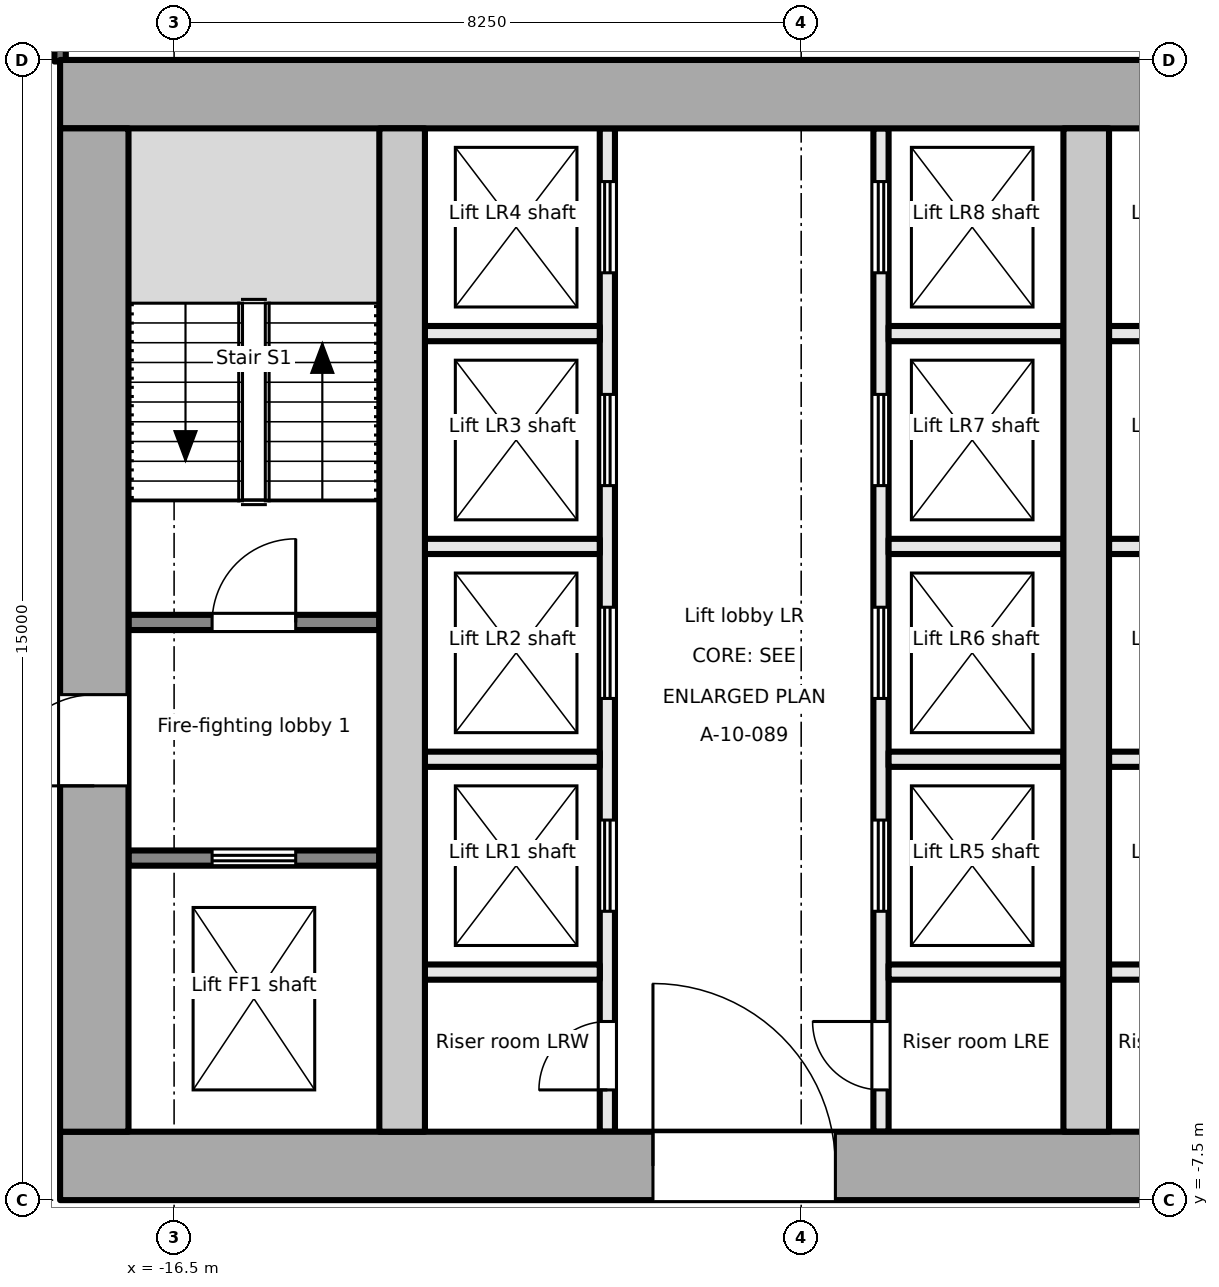
"""IFC4 building model, lengths in metres.
Left out: names, types, materials, properties, quantities, classifications, styles, units other than length and angle.
Written with IfcOpenShell. Run it as: python <this file> out.ifc"""

import sys

from ifc_helpers import new_model, si_unit, direction, frame, frame_2d, origin, place, context, subcontext, project, spatial, rectangle, extrude, element, fill, save


model = new_model("IFC4")
c1 = context("Model", 3, precision=1e-05, world=origin(), true_north=direction((0.0, 1.0)))
c2 = subcontext(c1, "Body", "Model", "MODEL_VIEW")
j1 = project(units=[si_unit("LENGTHUNIT", "METRE"), si_unit("PLANEANGLEUNIT", "RADIAN")], contexts=[c1])
p1 = place(None, origin())
s1 = spatial("IfcSite", under=j1, at=p1, CompositionType="ELEMENT")
p2 = place(p1, origin())
s2 = spatial("IfcBuilding", under=s1, at=p2, CompositionType="ELEMENT")
p3 = place(p2, frame((0.0, 0.0, 65.2)))
s3 = spatial("IfcBuildingStorey", under=s2, at=p3, CompositionType="ELEMENT", Elevation=65.2)
p4 = place(p3, frame((-18.0, -7.05, -0.2), z_axis=(0.0, 0.0, 1.0), x_axis=(1.0, 0.0, 0.0)))
e1 = element("IfcWall", 1, at=p4, inside=s3, PredefinedType="SHEAR", context=c2, shape_type="SweptSolid", body=[
    extrude(rectangle(XDim=36.0, YDim=0.9, at=frame_2d((18.0, 0.0))), origin(), (0.0, 0.0, 1.0), 4.1),
])
p5 = place(p4, frame((7.8, 0.0, 0.2)))
e2 = element("IfcOpeningElement", 2, at=p5, cuts=e1, PredefinedType="OPENING", context=c2, shape_type="SweptSolid", body=[
    extrude(rectangle(XDim=2.4, YDim=2.1, at=frame_2d((1.2, 1.05))), frame((0.0, 0.46, 0.0), z_axis=(0.0, -1.0, 0.0), x_axis=(1.0, 0.0, 0.0)), (0.0, 0.0, 1.0), 0.921),
])
p6 = place(p4, frame((17.4, 0.0, 0.2)))
e3 = element("IfcOpeningElement", 3, at=p6, cuts=e1, PredefinedType="OPENING", context=c2, shape_type="SweptSolid", body=[
    extrude(rectangle(XDim=1.2, YDim=2.1, at=frame_2d((0.6, 1.05))), frame((0.0, 0.46, 0.0), z_axis=(0.0, -1.0, 0.0), x_axis=(1.0, 0.0, 0.0)), (0.0, 0.0, 1.0), 0.921),
])
p7 = place(p4, frame((26.1, 0.0, 0.2)))
e4 = element("IfcOpeningElement", 4, at=p7, cuts=e1, PredefinedType="OPENING", context=c2, shape_type="SweptSolid", body=[
    extrude(rectangle(XDim=2.4, YDim=2.1, at=frame_2d((1.2, 1.05))), frame((0.0, 0.46, 0.0), z_axis=(0.0, -1.0, 0.0), x_axis=(1.0, 0.0, 0.0)), (0.0, 0.0, 1.0), 0.921),
])
p8 = place(p3, frame((-18.0, 7.05, -0.2), z_axis=(0.0, 0.0, 1.0), x_axis=(1.0, 0.0, 0.0)))
e5 = element("IfcWall", 5, at=p8, inside=s3, PredefinedType="SHEAR", context=c2, shape_type="SweptSolid", body=[
    extrude(rectangle(XDim=36.0, YDim=0.9, at=frame_2d((18.0, 0.0))), origin(), (0.0, 0.0, 1.0), 4.1),
])
p9 = place(p3, frame((-17.55, -6.6, -0.2), z_axis=(0.0, 0.0, 1.0), x_axis=(0.0, 1.0, 0.0)))
e6 = element("IfcWall", 6, at=p9, inside=s3, PredefinedType="SHEAR", context=c2, shape_type="SweptSolid", body=[
    extrude(rectangle(XDim=13.2, YDim=0.9, at=frame_2d((6.6, 0.0))), origin(), (0.0, 0.0, 1.0), 4.1),
])
p10 = place(p9, frame((4.55, 0.0, 0.2)))
e7 = element("IfcOpeningElement", 7, at=p10, cuts=e6, PredefinedType="OPENING", context=c2, shape_type="SweptSolid", body=[
    extrude(rectangle(XDim=1.2, YDim=2.1, at=frame_2d((0.6, 1.05))), frame((0.0, 0.46, 0.0), z_axis=(0.0, -1.0, 0.0), x_axis=(1.0, 0.0, 0.0)), (0.0, 0.0, 1.0), 0.921),
])
for number, where, z_axis, x_axis in (
    (8, (-13.5, -6.6, -0.2), (0.0, 0.0, 1.0), (0.0, 1.0, 0.0)),
    (9, (-4.5, -6.6, -0.2), (0.0, 0.0, 1.0), (0.0, 1.0, 0.0)),
):
    element("IfcWall", number, at=place(p3, frame(where, z_axis=z_axis, x_axis=x_axis)), inside=s3, PredefinedType="SHEAR", context=c2, shape_type="SweptSolid", body=[
        extrude(rectangle(XDim=13.2, YDim=0.6, at=frame_2d((6.6, 0.0))), origin(), (0.0, 0.0, 1.0), 4.1),
    ])
p11 = place(p3, frame((-17.1, -3.0, 0.0), z_axis=(0.0, 0.0, 1.0), x_axis=(1.0, 0.0, 0.0)))
e10 = element("IfcWall", 10, at=p11, inside=s3, PredefinedType="PARTITIONING", context=c2, shape_type="SweptSolid", body=[
    extrude(rectangle(XDim=3.3, YDim=0.2, at=frame_2d((1.65, 0.0))), origin(), (0.0, 0.0, 1.0), 3.9),
])
p12 = place(p11, frame((1.1, 0.0, 0.0)))
e11 = element("IfcOpeningElement", 11, at=p12, cuts=e10, PredefinedType="OPENING", context=c2, shape_type="SweptSolid", body=[
    extrude(rectangle(XDim=1.1, YDim=2.1, at=frame_2d((0.55, 1.05))), frame((0.0, 0.111, 0.0), z_axis=(0.0, -1.0, 0.0), x_axis=(1.0, 0.0, 0.0)), (0.0, 0.0, 1.0), 0.221),
])
p13 = place(p3, frame((-17.1, 0.1, 0.0), z_axis=(0.0, 0.0, 1.0), x_axis=(1.0, 0.0, 0.0)))
e12 = element("IfcWall", 12, at=p13, inside=s3, PredefinedType="PARTITIONING", context=c2, shape_type="SweptSolid", body=[
    extrude(rectangle(XDim=3.3, YDim=0.2, at=frame_2d((1.65, 0.0))), origin(), (0.0, 0.0, 1.0), 3.9),
])
p14 = place(p13, frame((1.1, 0.0, 0.0)))
e13 = element("IfcOpeningElement", 13, at=p14, cuts=e12, PredefinedType="OPENING", context=c2, shape_type="SweptSolid", body=[
    extrude(rectangle(XDim=1.1, YDim=2.1, at=frame_2d((0.55, 1.05))), frame((0.0, 0.111, 0.0), z_axis=(0.0, -1.0, 0.0), x_axis=(1.0, 0.0, 0.0)), (0.0, 0.0, 1.0), 0.221),
])
p15 = place(p3, frame((-10.8, -6.6, 0.0), z_axis=(0.0, 0.0, 1.0), x_axis=(0.0, 1.0, 0.0)))
e14 = element("IfcWall", 14, at=p15, inside=s3, PredefinedType="PARTITIONING", context=c2, shape_type="SweptSolid", body=[
    extrude(rectangle(XDim=13.2, YDim=0.2, at=frame_2d((6.6, 0.0))), origin(), (0.0, 0.0, 1.0), 3.9),
])
p16 = place(p15, frame((0.55, 0.0, 0.0)))
e15 = element("IfcOpeningElement", 15, at=p16, cuts=e14, PredefinedType="OPENING", context=c2, shape_type="SweptSolid", body=[
    extrude(rectangle(XDim=0.9, YDim=2.1, at=frame_2d((0.45, 1.05))), frame((0.0, 0.111, 0.0), z_axis=(0.0, -1.0, 0.0), x_axis=(1.0, 0.0, 0.0)), (0.0, 0.0, 1.0), 0.221),
])
p17 = place(p15, frame((2.9, 0.0, 0.0)))
e16 = element("IfcOpeningElement", 16, at=p17, cuts=e14, PredefinedType="OPENING", context=c2, shape_type="SweptSolid", body=[
    extrude(rectangle(XDim=1.2, YDim=2.1, at=frame_2d((0.6, 1.05))), frame((0.0, 0.111, 0.0), z_axis=(0.0, -1.0, 0.0), x_axis=(1.0, 0.0, 0.0)), (0.0, 0.0, 1.0), 0.221),
])
p18 = place(p15, frame((5.7, 0.0, 0.0)))
e17 = element("IfcOpeningElement", 17, at=p18, cuts=e14, PredefinedType="OPENING", context=c2, shape_type="SweptSolid", body=[
    extrude(rectangle(XDim=1.2, YDim=2.1, at=frame_2d((0.6, 1.05))), frame((0.0, 0.111, 0.0), z_axis=(0.0, -1.0, 0.0), x_axis=(1.0, 0.0, 0.0)), (0.0, 0.0, 1.0), 0.221),
])
p19 = place(p15, frame((8.5, 0.0, 0.0)))
e18 = element("IfcOpeningElement", 18, at=p19, cuts=e14, PredefinedType="OPENING", context=c2, shape_type="SweptSolid", body=[
    extrude(rectangle(XDim=1.2, YDim=2.1, at=frame_2d((0.6, 1.05))), frame((0.0, 0.111, 0.0), z_axis=(0.0, -1.0, 0.0), x_axis=(1.0, 0.0, 0.0)), (0.0, 0.0, 1.0), 0.221),
])
p20 = place(p15, frame((11.3, 0.0, 0.0)))
e19 = element("IfcOpeningElement", 19, at=p20, cuts=e14, PredefinedType="OPENING", context=c2, shape_type="SweptSolid", body=[
    extrude(rectangle(XDim=1.2, YDim=2.1, at=frame_2d((0.6, 1.05))), frame((0.0, 0.111, 0.0), z_axis=(0.0, -1.0, 0.0), x_axis=(1.0, 0.0, 0.0)), (0.0, 0.0, 1.0), 0.221),
])
p21 = place(p3, frame((-7.2, -6.6, 0.0), z_axis=(0.0, 0.0, 1.0), x_axis=(0.0, 1.0, 0.0)))
e20 = element("IfcWall", 20, at=p21, inside=s3, PredefinedType="PARTITIONING", context=c2, shape_type="SweptSolid", body=[
    extrude(rectangle(XDim=13.2, YDim=0.2, at=frame_2d((6.6, 0.0))), origin(), (0.0, 0.0, 1.0), 3.9),
])
p22 = place(p21, frame((0.55, 0.0, 0.0)))
e21 = element("IfcOpeningElement", 21, at=p22, cuts=e20, PredefinedType="OPENING", context=c2, shape_type="SweptSolid", body=[
    extrude(rectangle(XDim=0.9, YDim=2.1, at=frame_2d((0.45, 1.05))), frame((0.0, 0.111, 0.0), z_axis=(0.0, -1.0, 0.0), x_axis=(1.0, 0.0, 0.0)), (0.0, 0.0, 1.0), 0.221),
])
p23 = place(p21, frame((2.9, 0.0, 0.0)))
e22 = element("IfcOpeningElement", 22, at=p23, cuts=e20, PredefinedType="OPENING", context=c2, shape_type="SweptSolid", body=[
    extrude(rectangle(XDim=1.2, YDim=2.1, at=frame_2d((0.6, 1.05))), frame((0.0, 0.111, 0.0), z_axis=(0.0, -1.0, 0.0), x_axis=(1.0, 0.0, 0.0)), (0.0, 0.0, 1.0), 0.221),
])
p24 = place(p21, frame((5.7, 0.0, 0.0)))
e23 = element("IfcOpeningElement", 23, at=p24, cuts=e20, PredefinedType="OPENING", context=c2, shape_type="SweptSolid", body=[
    extrude(rectangle(XDim=1.2, YDim=2.1, at=frame_2d((0.6, 1.05))), frame((0.0, 0.111, 0.0), z_axis=(0.0, -1.0, 0.0), x_axis=(1.0, 0.0, 0.0)), (0.0, 0.0, 1.0), 0.221),
])
p25 = place(p21, frame((8.5, 0.0, 0.0)))
e24 = element("IfcOpeningElement", 24, at=p25, cuts=e20, PredefinedType="OPENING", context=c2, shape_type="SweptSolid", body=[
    extrude(rectangle(XDim=1.2, YDim=2.1, at=frame_2d((0.6, 1.05))), frame((0.0, 0.111, 0.0), z_axis=(0.0, -1.0, 0.0), x_axis=(1.0, 0.0, 0.0)), (0.0, 0.0, 1.0), 0.221),
])
p26 = place(p21, frame((11.3, 0.0, 0.0)))
e25 = element("IfcOpeningElement", 25, at=p26, cuts=e20, PredefinedType="OPENING", context=c2, shape_type="SweptSolid", body=[
    extrude(rectangle(XDim=1.2, YDim=2.1, at=frame_2d((0.6, 1.05))), frame((0.0, 0.111, 0.0), z_axis=(0.0, -1.0, 0.0), x_axis=(1.0, 0.0, 0.0)), (0.0, 0.0, 1.0), 0.221),
])
for number, where, z_axis, x_axis in (
    (26, (-13.2, -1.7, 0.0), (0.0, 0.0, 1.0), (1.0, 0.0, 0.0)),
    (27, (-13.2, 1.1, 0.0), (0.0, 0.0, 1.0), (1.0, 0.0, 0.0)),
    (28, (-13.2, 3.9, 0.0), (0.0, 0.0, 1.0), (1.0, 0.0, 0.0)),
    (29, (-13.2, -4.5, 0.0), (0.0, 0.0, 1.0), (1.0, 0.0, 0.0)),
    (30, (-7.1, -1.7, 0.0), (0.0, 0.0, 1.0), (1.0, 0.0, 0.0)),
    (31, (-7.1, 1.1, 0.0), (0.0, 0.0, 1.0), (1.0, 0.0, 0.0)),
    (32, (-7.1, 3.9, 0.0), (0.0, 0.0, 1.0), (1.0, 0.0, 0.0)),
    (33, (-7.1, -4.5, 0.0), (0.0, 0.0, 1.0), (1.0, 0.0, 0.0)),
    (34, (-4.2, -1.7, 0.0), (0.0, 0.0, 1.0), (1.0, 0.0, 0.0)),
    (35, (-4.2, 1.1, 0.0), (0.0, 0.0, 1.0), (1.0, 0.0, 0.0)),
    (36, (-4.2, 3.9, 0.0), (0.0, 0.0, 1.0), (1.0, 0.0, 0.0)),
    (37, (-4.2, -4.5, 0.0), (0.0, 0.0, 1.0), (1.0, 0.0, 0.0)),
):
    element("IfcWall", number, at=place(p3, frame(where, z_axis=z_axis, x_axis=x_axis)), inside=s3, PredefinedType="PARTITIONING", context=c2, shape_type="SweptSolid", body=[
        extrude(rectangle(XDim=2.3, YDim=0.2, at=frame_2d((1.15, 0.0))), origin(), (0.0, 0.0, 1.0), 3.9),
    ])
p27 = place(p3, frame((-18.0, 9.74, 0.0), z_axis=(0.0, 0.0, 1.0), x_axis=(0.0, -1.0, 0.0)))
e38 = element("IfcWall", 38, at=p27, inside=s3, PredefinedType="PARTITIONING", context=c2, shape_type="SweptSolid", body=[
    extrude(rectangle(XDim=2.26, YDim=0.15, at=frame_2d((1.13, 0.0))), origin(), (0.0, 0.0, 1.0), 2.9),
])
p28 = place(p27, frame((0.895, 0.0, 0.0)))
e39 = element("IfcOpeningElement", 39, at=p28, cuts=e38, PredefinedType="OPENING", context=c2, shape_type="SweptSolid", body=[
    extrude(rectangle(XDim=0.9, YDim=2.1, at=frame_2d((0.45, 1.05))), frame((0.0, 0.085, 0.0), z_axis=(0.0, -1.0, 0.0), x_axis=(1.0, 0.0, 0.0)), (0.0, 0.0, 1.0), 0.171),
])
p29 = place(p12, origin())
e40 = element("IfcDoor", 40, at=p29, inside=s3, OperationType="DOUBLE_DOOR_SLIDING", PredefinedType="DOOR", context=c2, shape_type="SweptSolid", body=[
    extrude(rectangle(XDim=1.1, YDim=2.1, at=frame_2d((0.55, 1.05))), frame((0.0, 0.025, 0.0), z_axis=(0.0, -1.0, 0.0), x_axis=(1.0, 0.0, 0.0)), (0.0, 0.0, 1.0), 0.05),
])
fill(e11, e40)
p30 = place(p10, origin())
e41 = element("IfcDoor", 41, at=p30, inside=s3, OperationType="SINGLE_SWING_LEFT", PredefinedType="DOOR", context=c2, shape_type="SweptSolid", body=[
    extrude(rectangle(XDim=1.2, YDim=2.1, at=frame_2d((0.6, 1.05))), frame((0.0, 0.025, 0.0), z_axis=(0.0, -1.0, 0.0), x_axis=(1.0, 0.0, 0.0)), (0.0, 0.0, 1.0), 0.05),
])
fill(e7, e41)
p31 = place(p14, origin())
e42 = element("IfcDoor", 42, at=p31, inside=s3, OperationType="SINGLE_SWING_RIGHT", PredefinedType="DOOR", context=c2, shape_type="SweptSolid", body=[
    extrude(rectangle(XDim=1.1, YDim=2.1, at=frame_2d((0.55, 1.05))), frame((0.0, 0.025, 0.0), z_axis=(0.0, -1.0, 0.0), x_axis=(1.0, 0.0, 0.0)), (0.0, 0.0, 1.0), 0.05),
])
fill(e13, e42)
p32 = place(p16, origin())
e43 = element("IfcDoor", 43, at=p32, inside=s3, OperationType="SINGLE_SWING_LEFT", PredefinedType="DOOR", context=c2, shape_type="SweptSolid", body=[
    extrude(rectangle(XDim=0.9, YDim=2.1, at=frame_2d((0.45, 1.05))), frame((0.0, 0.025, 0.0), z_axis=(0.0, -1.0, 0.0), x_axis=(1.0, 0.0, 0.0)), (0.0, 0.0, 1.0), 0.05),
])
fill(e15, e43)
p33 = place(p17, origin())
e44 = element("IfcDoor", 44, at=p33, inside=s3, OperationType="DOUBLE_DOOR_SLIDING", PredefinedType="DOOR", context=c2, shape_type="SweptSolid", body=[
    extrude(rectangle(XDim=1.2, YDim=2.1, at=frame_2d((0.6, 1.05))), frame((0.0, 0.025, 0.0), z_axis=(0.0, -1.0, 0.0), x_axis=(1.0, 0.0, 0.0)), (0.0, 0.0, 1.0), 0.05),
])
fill(e16, e44)
p34 = place(p18, origin())
e45 = element("IfcDoor", 45, at=p34, inside=s3, OperationType="DOUBLE_DOOR_SLIDING", PredefinedType="DOOR", context=c2, shape_type="SweptSolid", body=[
    extrude(rectangle(XDim=1.2, YDim=2.1, at=frame_2d((0.6, 1.05))), frame((0.0, 0.025, 0.0), z_axis=(0.0, -1.0, 0.0), x_axis=(1.0, 0.0, 0.0)), (0.0, 0.0, 1.0), 0.05),
])
fill(e17, e45)
p35 = place(p19, origin())
e46 = element("IfcDoor", 46, at=p35, inside=s3, OperationType="DOUBLE_DOOR_SLIDING", PredefinedType="DOOR", context=c2, shape_type="SweptSolid", body=[
    extrude(rectangle(XDim=1.2, YDim=2.1, at=frame_2d((0.6, 1.05))), frame((0.0, 0.025, 0.0), z_axis=(0.0, -1.0, 0.0), x_axis=(1.0, 0.0, 0.0)), (0.0, 0.0, 1.0), 0.05),
])
fill(e18, e46)
p36 = place(p20, origin())
e47 = element("IfcDoor", 47, at=p36, inside=s3, OperationType="DOUBLE_DOOR_SLIDING", PredefinedType="DOOR", context=c2, shape_type="SweptSolid", body=[
    extrude(rectangle(XDim=1.2, YDim=2.1, at=frame_2d((0.6, 1.05))), frame((0.0, 0.025, 0.0), z_axis=(0.0, -1.0, 0.0), x_axis=(1.0, 0.0, 0.0)), (0.0, 0.0, 1.0), 0.05),
])
fill(e19, e47)
p37 = place(p22, origin())
e48 = element("IfcDoor", 48, at=p37, inside=s3, OperationType="SINGLE_SWING_RIGHT", PredefinedType="DOOR", context=c2, shape_type="SweptSolid", body=[
    extrude(rectangle(XDim=0.9, YDim=2.1, at=frame_2d((0.45, 1.05))), frame((0.0, 0.025, 0.0), z_axis=(0.0, -1.0, 0.0), x_axis=(1.0, 0.0, 0.0)), (0.0, 0.0, 1.0), 0.05),
])
fill(e21, e48)
p38 = place(p23, origin())
e49 = element("IfcDoor", 49, at=p38, inside=s3, OperationType="DOUBLE_DOOR_SLIDING", PredefinedType="DOOR", context=c2, shape_type="SweptSolid", body=[
    extrude(rectangle(XDim=1.2, YDim=2.1, at=frame_2d((0.6, 1.05))), frame((0.0, 0.025, 0.0), z_axis=(0.0, -1.0, 0.0), x_axis=(1.0, 0.0, 0.0)), (0.0, 0.0, 1.0), 0.05),
])
fill(e22, e49)
p39 = place(p24, origin())
e50 = element("IfcDoor", 50, at=p39, inside=s3, OperationType="DOUBLE_DOOR_SLIDING", PredefinedType="DOOR", context=c2, shape_type="SweptSolid", body=[
    extrude(rectangle(XDim=1.2, YDim=2.1, at=frame_2d((0.6, 1.05))), frame((0.0, 0.025, 0.0), z_axis=(0.0, -1.0, 0.0), x_axis=(1.0, 0.0, 0.0)), (0.0, 0.0, 1.0), 0.05),
])
fill(e23, e50)
p40 = place(p25, origin())
e51 = element("IfcDoor", 51, at=p40, inside=s3, OperationType="DOUBLE_DOOR_SLIDING", PredefinedType="DOOR", context=c2, shape_type="SweptSolid", body=[
    extrude(rectangle(XDim=1.2, YDim=2.1, at=frame_2d((0.6, 1.05))), frame((0.0, 0.025, 0.0), z_axis=(0.0, -1.0, 0.0), x_axis=(1.0, 0.0, 0.0)), (0.0, 0.0, 1.0), 0.05),
])
fill(e24, e51)
p41 = place(p26, origin())
e52 = element("IfcDoor", 52, at=p41, inside=s3, OperationType="DOUBLE_DOOR_SLIDING", PredefinedType="DOOR", context=c2, shape_type="SweptSolid", body=[
    extrude(rectangle(XDim=1.2, YDim=2.1, at=frame_2d((0.6, 1.05))), frame((0.0, 0.025, 0.0), z_axis=(0.0, -1.0, 0.0), x_axis=(1.0, 0.0, 0.0)), (0.0, 0.0, 1.0), 0.05),
])
fill(e25, e52)
p42 = place(p5, origin())
e53 = element("IfcDoor", 53, at=p42, inside=s3, OperationType="DOUBLE_DOOR_DOUBLE_SWING", PredefinedType="DOOR", context=c2, shape_type="SweptSolid", body=[
    extrude(rectangle(XDim=2.4, YDim=2.1, at=frame_2d((1.2, 1.05))), frame((0.0, 0.025, 0.0), z_axis=(0.0, -1.0, 0.0), x_axis=(1.0, 0.0, 0.0)), (0.0, 0.0, 1.0), 0.05),
])
fill(e2, e53)
save(model, sys.argv[1])
